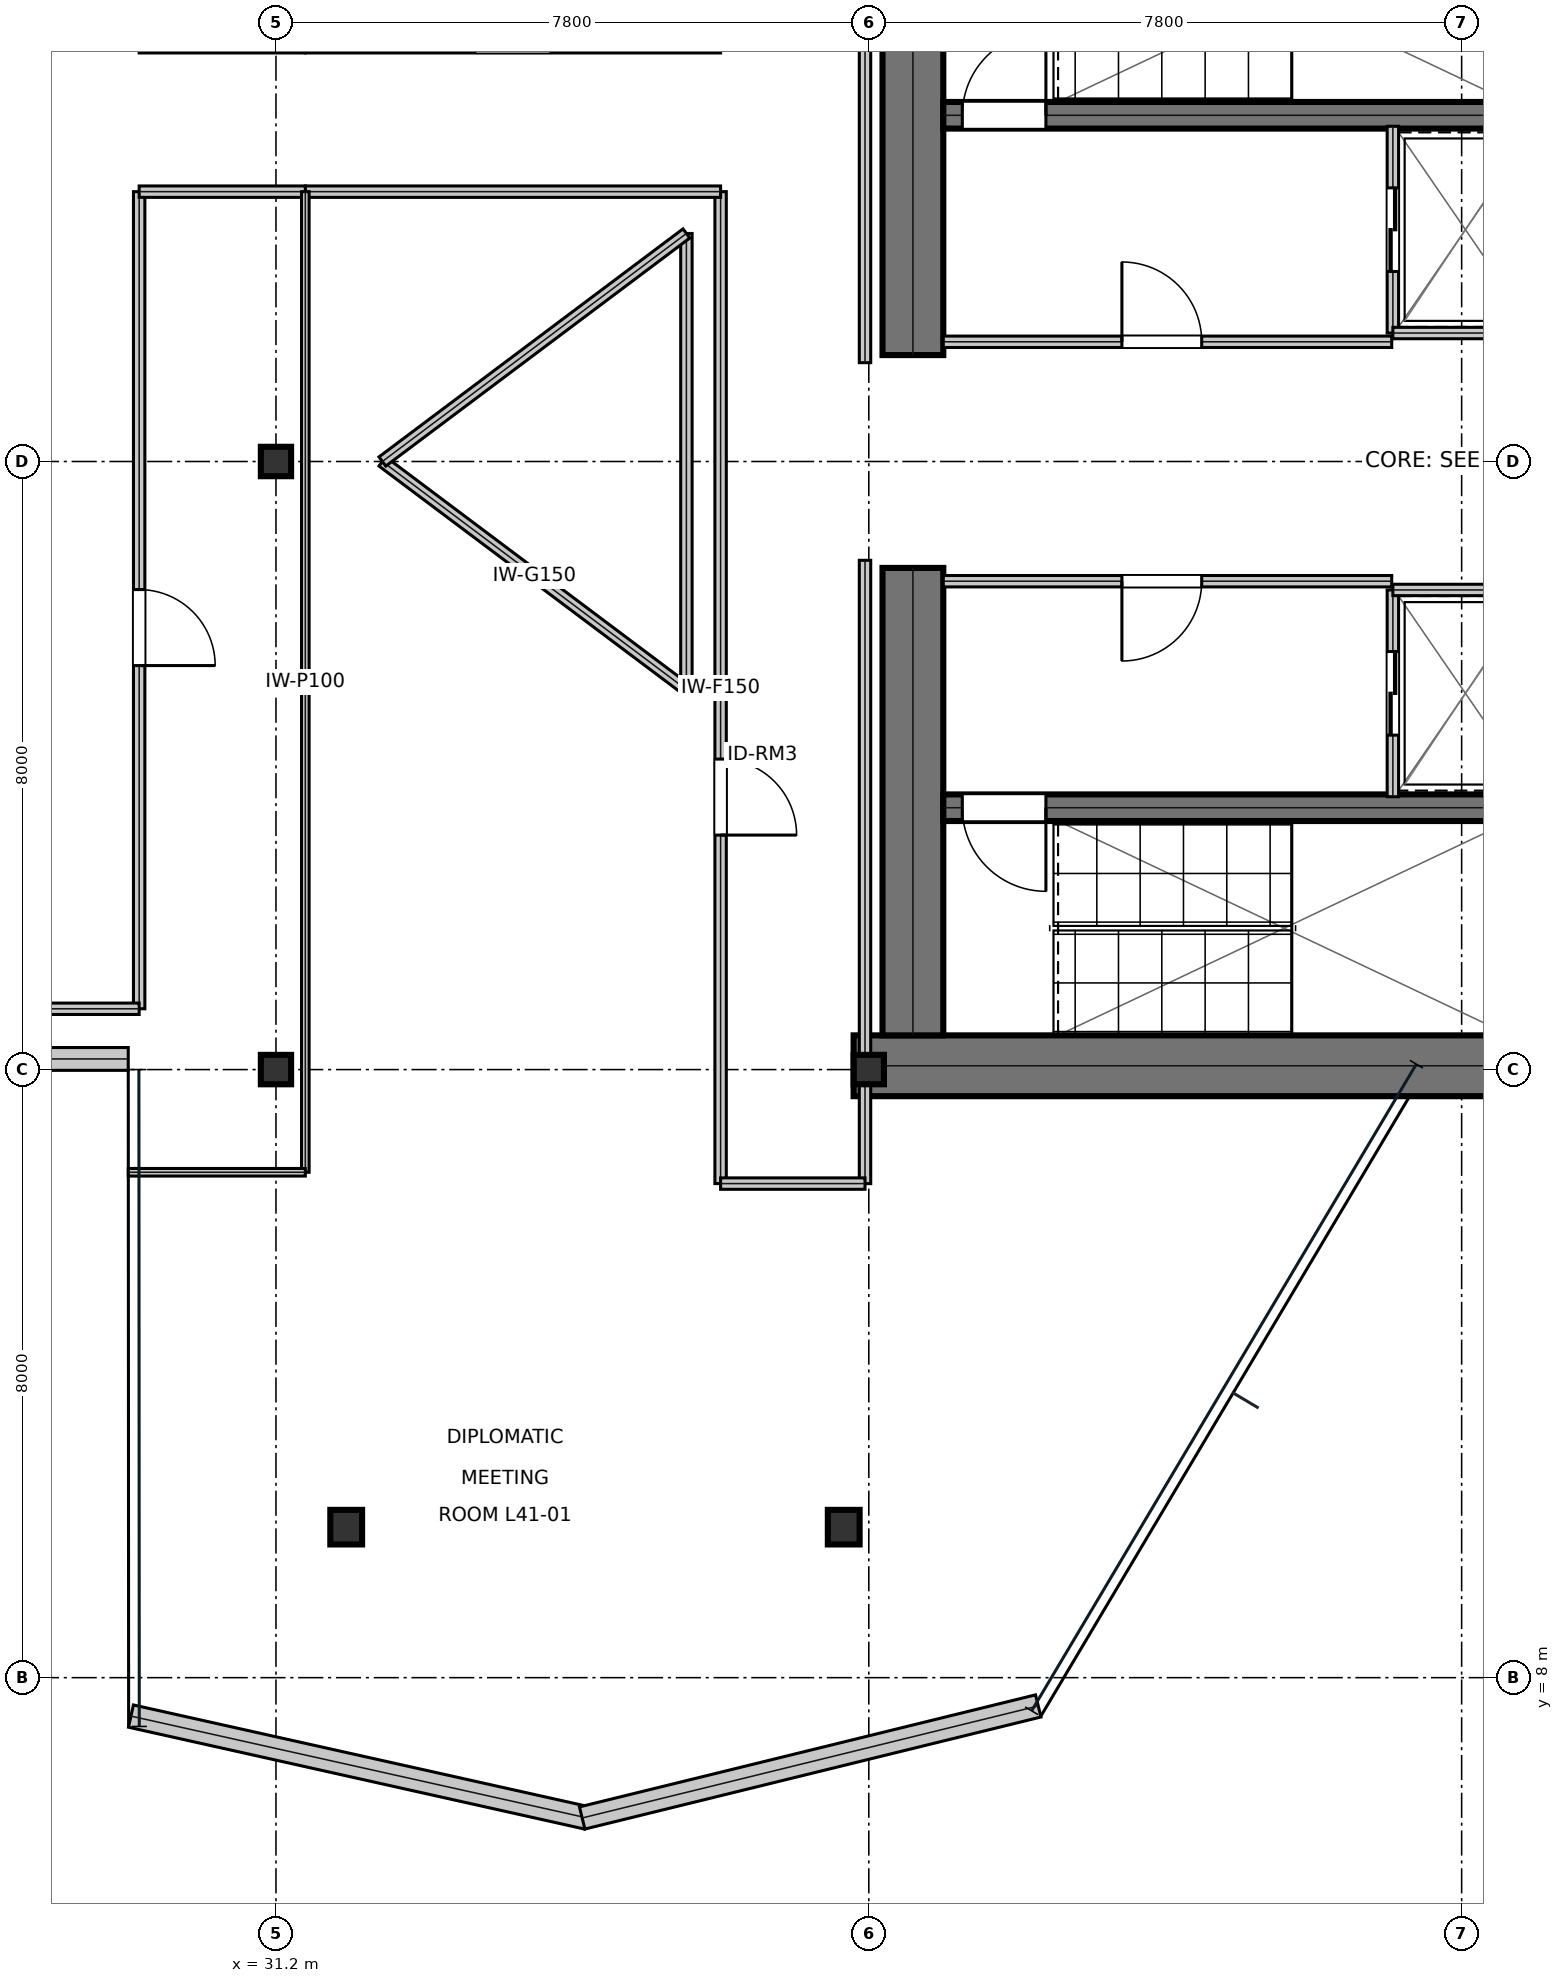
"""IFC4 building model, lengths in metres.
Left out: names, types, materials, properties, quantities, classifications, styles, units other than length and angle.
Written with IfcOpenShell. Run it as: python <this file> out.ifc"""

import sys

from ifc_helpers import new_model, si_unit, direction, frame, frame_2d, origin, origin_2d, place, context, subcontext, project, spatial, rectangle, i_section, extrude, element, fill, save


model = new_model("IFC4")
c1 = context("Model", 3, precision=1e-05, world=origin(), true_north=direction((0.0, 1.0)))
c2 = subcontext(c1, "Body", "Model", "MODEL_VIEW")
j1 = project(units=[si_unit("LENGTHUNIT", "METRE"), si_unit("PLANEANGLEUNIT", "RADIAN")], contexts=[c1])
p1 = place(None, origin())
s1 = spatial("IfcSite", under=j1, at=p1, CompositionType="ELEMENT")
p2 = place(p1, origin())
s2 = spatial("IfcBuilding", under=s1, at=p2, CompositionType="ELEMENT")
p3 = place(p2, frame((0.0, 0.0, 177.6)))
s3 = spatial("IfcBuildingStorey", under=s2, at=p3, CompositionType="ELEMENT", Elevation=177.6)
p4 = place(p3, frame((38.8, 16.05, 0.0), z_axis=(0.0, 0.0, 1.0), x_axis=(1.0, 0.0, 0.0)))
e1 = element("IfcWall", 1, at=p4, inside=s3, PredefinedType="SHEAR", context=c2, shape_type="SweptSolid", body=[
    extrude(rectangle(XDim=16.0, YDim=0.8, at=frame_2d((8.0, 0.0))), origin(), (0.0, 0.0, 1.0), 3.73),
])
for number, where, z_axis, x_axis in (
    (2, (39.58, 16.45, 0.0), (0.0, 0.0, 1.0), (0.0, 1.0, 0.0)),
    (3, (39.58, 25.4, 0.0), (0.0, 0.0, 1.0), (0.0, 1.0, 0.0)),
):
    element("IfcWall", number, at=place(p3, frame(where, z_axis=z_axis, x_axis=x_axis)), inside=s3, PredefinedType="SHEAR", context=c2, shape_type="SweptSolid", body=[
        extrude(rectangle(XDim=6.15, YDim=0.8, at=frame_2d((3.075, 0.0))), origin(), (0.0, 0.0, 1.0), 3.73),
    ])
p5 = place(p3, frame((39.98, 28.555, 0.0), z_axis=(0.0, 0.0, 1.0), x_axis=(1.0, 0.0, 0.0)))
e4 = element("IfcWall", 4, at=p5, inside=s3, PredefinedType="SHEAR", context=c2, shape_type="SweptSolid", body=[
    extrude(rectangle(XDim=7.71, YDim=0.35, at=frame_2d((3.855, 0.0))), origin(), (0.0, 0.0, 1.0), 3.73),
])
p6 = place(p5, frame((0.25, 0.0, 0.0)))
e5 = element("IfcOpeningElement", 5, at=p6, cuts=e4, PredefinedType="OPENING", context=c2, shape_type="SweptSolid", body=[
    extrude(rectangle(XDim=1.1, YDim=2.15, at=frame_2d((0.55, 1.075))), frame((0.0, 0.185, 0.0), z_axis=(0.0, -1.0, 0.0), x_axis=(1.0, 0.0, 0.0)), (0.0, 0.0, 1.0), 0.37),
])
p7 = place(p3, frame((39.98, 19.445, 0.0), z_axis=(0.0, 0.0, 1.0), x_axis=(1.0, 0.0, 0.0)))
e6 = element("IfcWall", 6, at=p7, inside=s3, PredefinedType="SHEAR", context=c2, shape_type="SweptSolid", body=[
    extrude(rectangle(XDim=7.71, YDim=0.35, at=frame_2d((3.855, 0.0))), origin(), (0.0, 0.0, 1.0), 3.73),
])
p8 = place(p7, frame((0.25, 0.0, 0.0)))
e7 = element("IfcOpeningElement", 7, at=p8, cuts=e6, PredefinedType="OPENING", context=c2, shape_type="SweptSolid", body=[
    extrude(rectangle(XDim=1.1, YDim=2.15, at=frame_2d((0.55, 1.075))), frame((0.0, 0.185, 0.0), z_axis=(0.0, -1.0, 0.0), x_axis=(1.0, 0.0, 0.0)), (0.0, 0.0, 1.0), 0.37),
])
for number, where, z_axis, x_axis in (
    (8, (31.2, 16.0, 0.0), (0.0, 0.0, 1.0), (1.0, 0.0, 0.0)),
    (9, (31.2, 24.0, 0.0), (0.0, 0.0, 1.0), (1.0, 0.0, 0.0)),
    (10, (39.0, 16.0, 0.0), (0.0, 0.0, 1.0), (1.0, 0.0, 0.0)),
):
    element("IfcColumn", number, at=place(p3, frame(where, z_axis=z_axis, x_axis=x_axis)), inside=s3, PredefinedType="COLUMN", context=c2, shape_type="SweptSolid", body=[
        extrude(i_section(OverallWidth=0.398, OverallDepth=0.387, WebThickness=0.021, FlangeThickness=0.033, at=origin_2d()), origin(), (0.0, 0.0, 1.0), 4.044),
    ])
p9 = place(p3, frame((32.124, 9.98, 0.016), z_axis=(0.010447648562, 0.022413850693, 0.999694186207), x_axis=(-0.906371306068, 0.422482018004, 0.0)))
e11 = element("IfcColumn", 11, at=p9, inside=s3, PredefinedType="COLUMN", context=c2, shape_type="SweptSolid", body=[
    extrude(i_section(OverallWidth=0.418, OverallDepth=0.455, WebThickness=0.042, FlangeThickness=0.068, at=origin_2d()), origin(), (0.0, 0.0, 1.0), 4.019),
])
p10 = place(p3, frame((38.67, 9.98, 0.016), z_axis=(-0.00370544751, 0.022414920183, 0.999741887195), x_axis=(-0.986609855888, -0.163098106258, 0.0)))
e12 = element("IfcColumn", 12, at=p10, inside=s3, PredefinedType="COLUMN", context=c2, shape_type="SweptSolid", body=[
    extrude(i_section(OverallWidth=0.418, OverallDepth=0.455, WebThickness=0.042, FlangeThickness=0.068, at=origin_2d()), origin(), (0.0, 0.0, 1.0), 4.019),
])
p11 = place(p3, frame((26.456, 16.14, 0.0), z_axis=(0.0, 0.0, 1.0), x_axis=(1.0, 0.0, 0.0)))
e13 = element("IfcWall", 13, at=p11, inside=s3, PredefinedType="STANDARD", context=c2, shape_type="SweptSolid", body=[
    extrude(rectangle(XDim=2.8, YDim=0.3, at=frame_2d((1.4, 0.0))), origin(), (0.0, 0.0, 1.0), 3.73),
])
p12 = place(p3, frame((29.292, 7.495, 0.0), z_axis=(0.0, 0.0, 1.0), x_axis=(0.975959494703, -0.217951977966, 0.0)))
e14 = element("IfcWall", 14, at=p12, inside=s3, PredefinedType="STANDARD", context=c2, shape_type="SweptSolid", body=[
    extrude(rectangle(XDim=6.148, YDim=0.3, at=frame_2d((3.074, 0.0))), origin(), (0.0, 0.0, 1.0), 3.73),
])
p13 = place(p3, frame((35.229, 6.154, 0.0), z_axis=(0.0, 0.0, 1.0), x_axis=(0.971135940566, 0.238526696497, 0.0)))
e15 = element("IfcWall", 15, at=p13, inside=s3, PredefinedType="STANDARD", context=c2, shape_type="SweptSolid", body=[
    extrude(rectangle(XDim=6.179, YDim=0.3, at=frame_2d((3.09, 0.0))), origin(), (0.0, 0.0, 1.0), 3.73),
])
p14 = place(p3, frame((39.98, 25.575, 0.0), z_axis=(0.0, 0.0, 1.0), x_axis=(1.0, 0.0, 0.0)))
e16 = element("IfcWall", 16, at=p14, inside=s3, PredefinedType="PARTITIONING", context=c2, shape_type="SweptSolid", body=[
    extrude(rectangle(XDim=5.9, YDim=0.15, at=frame_2d((2.95, 0.0))), origin(), (0.0, 0.0, 1.0), 3.73),
])
p15 = place(p14, frame((2.35, 0.0, 0.0)))
e17 = element("IfcOpeningElement", 17, at=p15, cuts=e16, PredefinedType="OPENING", context=c2, shape_type="SweptSolid", body=[
    extrude(rectangle(XDim=1.05, YDim=2.15, at=frame_2d((0.525, 1.075))), frame((0.0, 0.085, 0.0), z_axis=(0.0, -1.0, 0.0), x_axis=(1.0, 0.0, 0.0)), (0.0, 0.0, 1.0), 0.17),
])
p16 = place(p3, frame((39.98, 22.425, 0.0), z_axis=(0.0, 0.0, 1.0), x_axis=(1.0, 0.0, 0.0)))
e18 = element("IfcWall", 18, at=p16, inside=s3, PredefinedType="PARTITIONING", context=c2, shape_type="SweptSolid", body=[
    extrude(rectangle(XDim=5.9, YDim=0.15, at=frame_2d((2.95, 0.0))), origin(), (0.0, 0.0, 1.0), 3.73),
])
p17 = place(p16, frame((2.35, 0.0, 0.0)))
e19 = element("IfcOpeningElement", 19, at=p17, cuts=e18, PredefinedType="OPENING", context=c2, shape_type="SweptSolid", body=[
    extrude(rectangle(XDim=1.05, YDim=2.15, at=frame_2d((0.525, 1.075))), frame((0.0, 0.085, 0.0), z_axis=(0.0, -1.0, 0.0), x_axis=(1.0, 0.0, 0.0)), (0.0, 0.0, 1.0), 0.17),
])
p18 = place(p3, frame((45.895, 25.69, 0.0), z_axis=(0.0, 0.0, 1.0), x_axis=(0.0, 1.0, 0.0)))
e20 = element("IfcWall", 20, at=p18, inside=s3, PredefinedType="PARTITIONING", context=c2, shape_type="SweptSolid", body=[
    extrude(rectangle(XDim=2.72, YDim=0.15, at=frame_2d((1.36, 0.0))), origin(), (0.0, 0.0, 1.0), 3.73),
])
p19 = place(p18, frame((0.81, 0.0, 0.0)))
e21 = element("IfcOpeningElement", 21, at=p19, cuts=e20, PredefinedType="OPENING", context=c2, shape_type="SweptSolid", body=[
    extrude(rectangle(XDim=1.1, YDim=2.15, at=frame_2d((0.55, 1.075))), frame((0.0, 0.085, 0.0), z_axis=(0.0, -1.0, 0.0), x_axis=(1.0, 0.0, 0.0)), (0.0, 0.0, 1.0), 0.17),
])
p20 = place(p3, frame((45.895, 25.69, 0.0), z_axis=(0.0, 0.0, 1.0), x_axis=(1.0, 0.0, 0.0)))
e22 = element("IfcWall", 22, at=p20, inside=s3, PredefinedType="PARTITIONING", context=c2, shape_type="SweptSolid", body=[
    extrude(rectangle(XDim=1.915, YDim=0.15, at=frame_2d((0.958, 0.0))), origin(), (0.0, 0.0, 1.0), 3.73),
])
p21 = place(p3, frame((45.895, 19.59, 0.0), z_axis=(0.0, 0.0, 1.0), x_axis=(0.0, 1.0, 0.0)))
e23 = element("IfcWall", 23, at=p21, inside=s3, PredefinedType="PARTITIONING", context=c2, shape_type="SweptSolid", body=[
    extrude(rectangle(XDim=2.72, YDim=0.15, at=frame_2d((1.36, 0.0))), origin(), (0.0, 0.0, 1.0), 3.73),
])
p22 = place(p21, frame((0.81, 0.0, 0.0)))
e24 = element("IfcOpeningElement", 24, at=p22, cuts=e23, PredefinedType="OPENING", context=c2, shape_type="SweptSolid", body=[
    extrude(rectangle(XDim=1.1, YDim=2.15, at=frame_2d((0.55, 1.075))), frame((0.0, 0.085, 0.0), z_axis=(0.0, -1.0, 0.0), x_axis=(1.0, 0.0, 0.0)), (0.0, 0.0, 1.0), 0.17),
])
p23 = place(p3, frame((45.895, 22.31, 0.0), z_axis=(0.0, 0.0, 1.0), x_axis=(1.0, 0.0, 0.0)))
e25 = element("IfcWall", 25, at=p23, inside=s3, PredefinedType="PARTITIONING", context=c2, shape_type="SweptSolid", body=[
    extrude(rectangle(XDim=1.915, YDim=0.15, at=frame_2d((0.958, 0.0))), origin(), (0.0, 0.0, 1.0), 3.73),
])
p24 = place(p3, frame((37.05, 14.5, 0.0), z_axis=(0.0, 0.0, 1.0), x_axis=(0.0, 1.0, 0.0)))
e26 = element("IfcWall", 26, at=p24, inside=s3, PredefinedType="PARTITIONING", context=c2, shape_type="SweptSolid", body=[
    extrude(rectangle(XDim=13.05, YDim=0.15, at=frame_2d((6.525, 0.0))), origin(), (0.0, 0.0, 1.0), 3.11),
])
p25 = place(p24, frame((4.585, 0.0, 0.0)))
e27 = element("IfcOpeningElement", 27, at=p25, cuts=e26, PredefinedType="OPENING", context=c2, shape_type="SweptSolid", body=[
    extrude(rectangle(XDim=1.0, YDim=2.15, at=frame_2d((0.5, 1.075))), frame((0.0, 0.085, 0.0), z_axis=(0.0, -1.0, 0.0), x_axis=(1.0, 0.0, 0.0)), (0.0, 0.0, 1.0), 0.17),
])
p26 = place(p3, frame((29.4, 16.8, 0.0), z_axis=(0.0, 0.0, 1.0), x_axis=(0.0, 1.0, 0.0)))
e28 = element("IfcWall", 28, at=p26, inside=s3, PredefinedType="PARTITIONING", context=c2, shape_type="SweptSolid", body=[
    extrude(rectangle(XDim=10.75, YDim=0.15, at=frame_2d((5.375, 0.0))), origin(), (0.0, 0.0, 1.0), 3.11),
])
p27 = place(p26, frame((4.515, 0.0, 0.0)))
e29 = element("IfcOpeningElement", 29, at=p27, cuts=e28, PredefinedType="OPENING", context=c2, shape_type="SweptSolid", body=[
    extrude(rectangle(XDim=1.0, YDim=2.15, at=frame_2d((0.5, 1.075))), frame((0.0, 0.085, 0.0), z_axis=(0.0, -1.0, 0.0), x_axis=(1.0, 0.0, 0.0)), (0.0, 0.0, 1.0), 0.17),
])
p28 = place(p3, frame((31.586, 29.45, 0.0), z_axis=(0.0, 0.0, 1.0), x_axis=(1.0, 0.0, 0.0)))
e30 = element("IfcWall", 30, at=p28, inside=s3, PredefinedType="PARTITIONING", context=c2, shape_type="SweptSolid", body=[
    extrude(rectangle(XDim=5.464, YDim=0.15, at=frame_2d((2.732, 0.0))), origin(), (0.0, 0.0, 1.0), 3.73),
])
p29 = place(p28, frame((2.232, 0.0, 0.0)))
e31 = element("IfcOpeningElement", 31, at=p29, cuts=e30, PredefinedType="OPENING", context=c2, shape_type="SweptSolid", body=[
    extrude(rectangle(XDim=1.0, YDim=2.15, at=frame_2d((0.5, 1.075))), frame((0.0, 0.085, 0.0), z_axis=(0.0, -1.0, 0.0), x_axis=(1.0, 0.0, 0.0)), (0.0, 0.0, 1.0), 0.17),
])
p30 = place(p3, frame((38.95, 14.5, 0.0), z_axis=(0.0, 0.0, 1.0), x_axis=(0.0, 1.0, 0.0)))
e32 = element("IfcWall", 32, at=p30, inside=s3, PredefinedType="PARTITIONING", context=c2, shape_type="SweptSolid", body=[
    extrude(rectangle(XDim=8.2, YDim=0.15, at=frame_2d((4.1, 0.0))), origin(), (0.0, 0.0, 1.0), 3.11),
])
p31 = place(p3, frame((31.586, 27.55, 0.0), z_axis=(0.0, 0.0, 1.0), x_axis=(1.0, 0.0, 0.0)))
e33 = element("IfcWall", 33, at=p31, inside=s3, PredefinedType="PARTITIONING", context=c2, shape_type="SweptSolid", body=[
    extrude(rectangle(XDim=5.464, YDim=0.15, at=frame_2d((2.732, 0.0))), origin(), (0.0, 0.0, 1.0), 3.363),
])
p32 = place(p3, frame((37.05, 14.5, 0.0), z_axis=(0.0, 0.0, 1.0), x_axis=(1.0, 0.0, 0.0)))
e34 = element("IfcWall", 34, at=p32, inside=s3, PredefinedType="PARTITIONING", context=c2, shape_type="SweptSolid", body=[
    extrude(rectangle(XDim=1.9, YDim=0.15, at=frame_2d((0.95, 0.0))), origin(), (0.0, 0.0, 1.0), 3.11),
])
p33 = place(p3, frame((26.596, 16.8, 0.0), z_axis=(0.0, 0.0, 1.0), x_axis=(1.0, 0.0, 0.0)))
e35 = element("IfcWall", 35, at=p33, inside=s3, PredefinedType="PARTITIONING", context=c2, shape_type="SweptSolid", body=[
    extrude(rectangle(XDim=2.804, YDim=0.15, at=frame_2d((1.402, 0.0))), origin(), (0.0, 0.0, 1.0), 3.258),
])
for number, where, z_axis, x_axis in (
    (36, (29.4, 27.55, 0.0), (0.0, 0.0, 1.0), (1.0, 0.0, 0.0)),
    (37, (29.4, 29.45, 0.0), (0.0, 0.0, 1.0), (1.0, 0.0, 0.0)),
):
    element("IfcWall", number, at=place(p3, frame(where, z_axis=z_axis, x_axis=x_axis)), inside=s3, PredefinedType="PARTITIONING", context=c2, shape_type="SweptSolid", body=[
        extrude(rectangle(XDim=2.186, YDim=0.15, at=frame_2d((1.093, 0.0))), origin(), (0.0, 0.0, 1.0), 3.11),
    ])
p34 = place(p3, frame((38.95, 25.3, 0.0), z_axis=(0.0, 0.0, 1.0), x_axis=(0.0, 1.0, 0.0)))
e38 = element("IfcWall", 38, at=p34, inside=s3, PredefinedType="PARTITIONING", context=c2, shape_type="SweptSolid", body=[
    extrude(rectangle(XDim=8.2, YDim=0.15, at=frame_2d((4.1, 0.0))), origin(), (0.0, 0.0, 1.0), 3.11),
])
p35 = place(p3, frame((31.586, 14.649, 0.0), z_axis=(0.0, 0.0, 1.0), x_axis=(0.0, 1.0, 0.0)))
e39 = element("IfcWall", 39, at=p35, inside=s3, PredefinedType="PARTITIONING", context=c2, shape_type="SweptSolid", body=[
    extrude(rectangle(XDim=12.901, YDim=0.1, at=frame_2d((6.451, 0.0))), origin(), (0.0, 0.0, 1.0), 3.11),
])
p36 = place(p3, frame((29.257, 14.649, 0.0), z_axis=(0.0, 0.0, 1.0), x_axis=(1.0, 0.0, 0.0)))
e40 = element("IfcWall", 40, at=p36, inside=s3, PredefinedType="PARTITIONING", context=c2, shape_type="SweptSolid", body=[
    extrude(rectangle(XDim=2.329, YDim=0.1, at=frame_2d((1.165, 0.0))), origin(), (0.0, 0.0, 1.0), 3.73),
])
p37 = place(p3, frame((32.6, 24.0, 0.0), z_axis=(0.0, 0.0, 1.0), x_axis=(0.8, -0.6, 0.0)))
e41 = element("IfcWall", 41, at=p37, inside=s3, PredefinedType="MOVABLE", context=c2, shape_type="SweptSolid", body=[
    extrude(rectangle(XDim=5.0, YDim=0.15, at=frame_2d((2.5, 0.0))), origin(), (0.0, 0.0, 1.0), 3.73),
])
p38 = place(p3, frame((36.6, 21.0, 0.0), z_axis=(0.0, 0.0, 1.0), x_axis=(0.0, 1.0, 0.0)))
e42 = element("IfcWall", 42, at=p38, inside=s3, PredefinedType="MOVABLE", context=c2, shape_type="SweptSolid", body=[
    extrude(rectangle(XDim=6.0, YDim=0.15, at=frame_2d((3.0, 0.0))), origin(), (0.0, 0.0, 1.0), 3.73),
])
p39 = place(p3, frame((36.6, 27.0, 0.0), z_axis=(0.0, 0.0, 1.0), x_axis=(-0.8, -0.6, 0.0)))
e43 = element("IfcWall", 43, at=p39, inside=s3, PredefinedType="MOVABLE", context=c2, shape_type="SweptSolid", body=[
    extrude(rectangle(XDim=5.0, YDim=0.15, at=frame_2d((2.5, 0.0))), origin(), (0.0, 0.0, 1.0), 3.73),
])
p40 = place(p15, origin())
e44 = element("IfcDoor", 44, at=p40, inside=s3, OperationType="SINGLE_SWING_LEFT", PredefinedType="DOOR", context=c2, shape_type="SweptSolid", body=[
    extrude(rectangle(XDim=1.05, YDim=2.15, at=frame_2d((0.525, 1.075))), frame((0.0, 0.025, 0.0), z_axis=(0.0, -1.0, 0.0), x_axis=(1.0, 0.0, 0.0)), (0.0, 0.0, 1.0), 0.05),
])
fill(e17, e44)
p41 = place(p17, frame((1.05, 0.0, 0.0), z_axis=(0.0, 0.0, 1.0), x_axis=(-1.0, 0.0, 0.0)))
e45 = element("IfcDoor", 45, at=p41, inside=s3, OperationType="SINGLE_SWING_RIGHT", PredefinedType="DOOR", context=c2, shape_type="SweptSolid", body=[
    extrude(rectangle(XDim=1.05, YDim=2.15, at=frame_2d((0.525, 1.075))), frame((0.0, 0.025, 0.0), z_axis=(0.0, -1.0, 0.0), x_axis=(1.0, 0.0, 0.0)), (0.0, 0.0, 1.0), 0.05),
])
fill(e19, e45)
p42 = place(p19, frame((1.1, 0.0, 0.0), z_axis=(0.0, 0.0, 1.0), x_axis=(-1.0, 0.0, 0.0)))
e46 = element("IfcDoor", 46, at=p42, inside=s3, OperationType="DOUBLE_DOOR_SLIDING", PredefinedType="DOOR", context=c2, shape_type="SweptSolid", body=[
    extrude(rectangle(XDim=1.1, YDim=2.15, at=frame_2d((0.55, 1.075))), frame((0.0, 0.025, 0.0), z_axis=(0.0, -1.0, 0.0), x_axis=(1.0, 0.0, 0.0)), (0.0, 0.0, 1.0), 0.05),
])
fill(e21, e46)
p43 = place(p22, frame((1.1, 0.0, 0.0), z_axis=(0.0, 0.0, 1.0), x_axis=(-1.0, 0.0, 0.0)))
e47 = element("IfcDoor", 47, at=p43, inside=s3, OperationType="DOUBLE_DOOR_SLIDING", PredefinedType="DOOR", context=c2, shape_type="SweptSolid", body=[
    extrude(rectangle(XDim=1.1, YDim=2.15, at=frame_2d((0.55, 1.075))), frame((0.0, 0.025, 0.0), z_axis=(0.0, -1.0, 0.0), x_axis=(1.0, 0.0, 0.0)), (0.0, 0.0, 1.0), 0.05),
])
fill(e24, e47)
p44 = place(p25, frame((1.0, 0.0, 0.0), z_axis=(0.0, 0.0, 1.0), x_axis=(-1.0, 0.0, 0.0)))
e48 = element("IfcDoor", 48, at=p44, inside=s3, OperationType="SINGLE_SWING_RIGHT", PredefinedType="DOOR", context=c2, shape_type="SweptSolid", body=[
    extrude(rectangle(XDim=1.0, YDim=2.15, at=frame_2d((0.5, 1.075))), frame((0.0, 0.025, 0.0), z_axis=(0.0, -1.0, 0.0), x_axis=(1.0, 0.0, 0.0)), (0.0, 0.0, 1.0), 0.05),
])
fill(e27, e48)
p45 = place(p27, frame((1.0, 0.0, 0.0), z_axis=(0.0, 0.0, 1.0), x_axis=(-1.0, 0.0, 0.0)))
e49 = element("IfcDoor", 49, at=p45, inside=s3, OperationType="SINGLE_SWING_RIGHT", PredefinedType="DOOR", context=c2, shape_type="SweptSolid", body=[
    extrude(rectangle(XDim=1.0, YDim=2.15, at=frame_2d((0.5, 1.075))), frame((0.0, 0.025, 0.0), z_axis=(0.0, -1.0, 0.0), x_axis=(1.0, 0.0, 0.0)), (0.0, 0.0, 1.0), 0.05),
])
fill(e29, e49)
p46 = place(p6, origin())
e50 = element("IfcDoor", 50, at=p46, inside=s3, OperationType="SINGLE_SWING_RIGHT", PredefinedType="DOOR", context=c2, shape_type="SweptSolid", body=[
    extrude(rectangle(XDim=1.1, YDim=2.15, at=frame_2d((0.55, 1.075))), frame((0.0, 0.025, 0.0), z_axis=(0.0, -1.0, 0.0), x_axis=(1.0, 0.0, 0.0)), (0.0, 0.0, 1.0), 0.05),
])
fill(e5, e50)
p47 = place(p8, frame((1.1, 0.0, 0.0), z_axis=(0.0, 0.0, 1.0), x_axis=(-1.0, 0.0, 0.0)))
e51 = element("IfcDoor", 51, at=p47, inside=s3, OperationType="SINGLE_SWING_LEFT", PredefinedType="DOOR", context=c2, shape_type="SweptSolid", body=[
    extrude(rectangle(XDim=1.1, YDim=2.15, at=frame_2d((0.55, 1.075))), frame((0.0, 0.025, 0.0), z_axis=(0.0, -1.0, 0.0), x_axis=(1.0, 0.0, 0.0)), (0.0, 0.0, 1.0), 0.05),
])
fill(e7, e51)
save(model, sys.argv[1])
